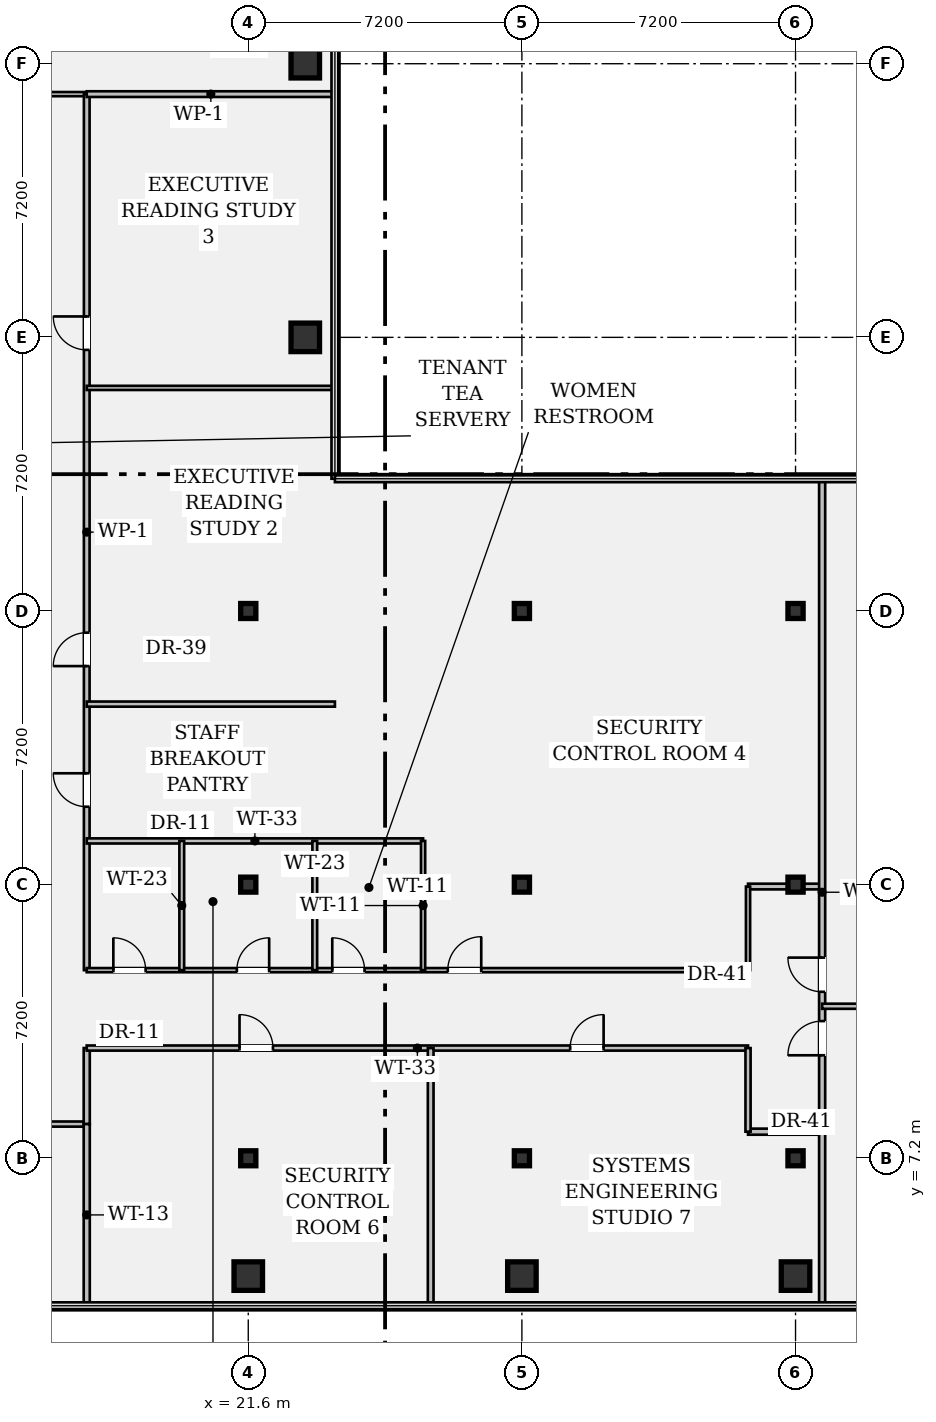
"""IFC4 building model, lengths in metres.
Left out: names, types, materials, properties, quantities, classifications, styles, units other than length and angle.
Written with IfcOpenShell. Run it as: python <this file> out.ifc"""

import sys

from ifc_helpers import new_model, si_unit, direction, frame, frame_2d, origin, origin_2d, place, context, subcontext, project, spatial, rectangle, hollow_rectangle, i_section, extrude, element, fill, save


model = new_model("IFC4")
c1 = context("Model", 3, precision=1e-05, world=origin(), true_north=direction((0.0, 1.0)))
c2 = subcontext(c1, "Body", "Model", "MODEL_VIEW")
j1 = project(units=[si_unit("LENGTHUNIT", "METRE"), si_unit("PLANEANGLEUNIT", "RADIAN")], contexts=[c1])
p1 = place(None, origin())
s1 = spatial("IfcSite", under=j1, at=p1, CompositionType="ELEMENT")
p2 = place(p1, origin())
s2 = spatial("IfcBuilding", under=s1, at=p2, CompositionType="ELEMENT")
p3 = place(p2, frame((0.0, 0.0, 225.75)))
s3 = spatial("IfcBuildingStorey", under=s2, at=p3, CompositionType="ELEMENT", Elevation=225.75)
p4 = place(p3, frame((21.6, 4.1, 0.0), z_axis=(0.0, 0.0, 1.0), x_axis=(1.0, 0.0, 0.0)))
e1 = element("IfcColumn", 1, at=p4, inside=s3, PredefinedType="COLUMN", context=c2, shape_type="SweptSolid", body=[
    extrude(hollow_rectangle(XDim=0.75, YDim=0.75, WallThickness=0.045, at=origin_2d()), origin(), (0.0, 0.0, 1.0), 3.24),
])
for number, where, z_axis, x_axis in (
    (2, (21.6, 7.2, 0.0), (0.0, 0.0, 1.0), (1.0, 0.0, 0.0)),
    (3, (21.6, 14.4, 0.0), (0.0, 0.0, 1.0), (1.0, 0.0, 0.0)),
    (4, (21.6, 21.6, 0.0), (0.0, 0.0, 1.0), (1.0, 0.0, 0.0)),
):
    element("IfcColumn", number, at=place(p3, frame(where, z_axis=z_axis, x_axis=x_axis)), inside=s3, PredefinedType="COLUMN", context=c2, shape_type="SweptSolid", body=[
        extrude(i_section(OverallWidth=0.399, OverallDepth=0.394, WebThickness=0.023, FlangeThickness=0.037, FilletRadius=0.018, at=origin_2d()), origin(), (0.0, 0.0, 1.0), 3.24),
    ])
for number, where, z_axis, x_axis in (
    (5, (23.1, 28.8, 0.0), (0.0, 0.0, 1.0), (1.0, 0.0, 0.0)),
    (6, (23.1, 36.0, 0.0), (0.0, 0.0, 1.0), (1.0, 0.0, 0.0)),
    (7, (28.8, 4.1, 0.0), (0.0, 0.0, 1.0), (1.0, 0.0, 0.0)),
):
    element("IfcColumn", number, at=place(p3, frame(where, z_axis=z_axis, x_axis=x_axis)), inside=s3, PredefinedType="COLUMN", context=c2, shape_type="SweptSolid", body=[
        extrude(hollow_rectangle(XDim=0.75, YDim=0.75, WallThickness=0.045, at=origin_2d()), origin(), (0.0, 0.0, 1.0), 3.24),
    ])
for number, where, z_axis, x_axis in (
    (8, (28.8, 7.2, 0.0), (0.0, 0.0, 1.0), (1.0, 0.0, 0.0)),
    (9, (28.8, 14.4, 0.0), (0.0, 0.0, 1.0), (1.0, 0.0, 0.0)),
    (10, (28.8, 21.6, 0.0), (0.0, 0.0, 1.0), (1.0, 0.0, 0.0)),
):
    element("IfcColumn", number, at=place(p3, frame(where, z_axis=z_axis, x_axis=x_axis)), inside=s3, PredefinedType="COLUMN", context=c2, shape_type="SweptSolid", body=[
        extrude(i_section(OverallWidth=0.399, OverallDepth=0.394, WebThickness=0.023, FlangeThickness=0.037, FilletRadius=0.018, at=origin_2d()), origin(), (0.0, 0.0, 1.0), 3.24),
    ])
p5 = place(p3, frame((36.0, 4.1, 0.0), z_axis=(0.0, 0.0, 1.0), x_axis=(1.0, 0.0, 0.0)))
e11 = element("IfcColumn", 11, at=p5, inside=s3, PredefinedType="COLUMN", context=c2, shape_type="SweptSolid", body=[
    extrude(hollow_rectangle(XDim=0.75, YDim=0.75, WallThickness=0.045, at=origin_2d()), origin(), (0.0, 0.0, 1.0), 3.24),
])
for number, where, z_axis, x_axis in (
    (12, (36.0, 7.2, 0.0), (0.0, 0.0, 1.0), (1.0, 0.0, 0.0)),
    (13, (36.0, 14.4, 0.0), (0.0, 0.0, 1.0), (1.0, 0.0, 0.0)),
    (14, (36.0, 21.6, 0.0), (0.0, 0.0, 1.0), (1.0, 0.0, 0.0)),
):
    element("IfcColumn", number, at=place(p3, frame(where, z_axis=z_axis, x_axis=x_axis)), inside=s3, PredefinedType="COLUMN", context=c2, shape_type="SweptSolid", body=[
        extrude(i_section(OverallWidth=0.399, OverallDepth=0.394, WebThickness=0.023, FlangeThickness=0.037, FilletRadius=0.018, at=origin_2d()), origin(), (0.0, 0.0, 1.0), 3.24),
    ])
p6 = place(p3, frame((14.4, 8.1, 0.0), z_axis=(0.0, 0.0, 1.0), x_axis=(1.0, 0.0, 0.0)))
e15 = element("IfcWall", 15, at=p6, inside=s3, PredefinedType="PARTITIONING", context=c2, shape_type="SweptSolid", body=[
    extrude(rectangle(XDim=2.95, YDim=0.135, at=frame_2d((1.475, 0.0))), origin(), (0.0, 0.0, 1.0), 2.808),
])
p7 = place(p6, frame((0.95, 0.0, 0.0)))
e16 = element("IfcOpeningElement", 16, at=p7, cuts=e15, PredefinedType="OPENING", context=c2, shape_type="SweptSolid", body=[
    extrude(rectangle(XDim=0.88, YDim=2.15, at=frame_2d((0.44, 1.075))), frame((0.0, 0.08, 0.0), z_axis=(0.0, -1.0, 0.0), x_axis=(1.0, 0.0, 0.0)), (0.0, 0.0, 1.0), 0.159),
])
p8 = place(p3, frame((14.4, 35.2, 0.0), z_axis=(0.0, 0.0, 1.0), x_axis=(1.0, 0.0, 0.0)))
e17 = element("IfcWall", 17, at=p8, inside=s3, PredefinedType="PARTITIONING", context=c2, shape_type="SweptSolid", body=[
    extrude(rectangle(XDim=2.95, YDim=0.11, at=frame_2d((1.475, 0.0))), origin(), (0.0, 0.0, 1.0), 2.808),
])
p9 = place(p8, frame((0.95, 0.0, 0.0)))
e18 = element("IfcOpeningElement", 18, at=p9, cuts=e17, PredefinedType="OPENING", context=c2, shape_type="SweptSolid", body=[
    extrude(rectangle(XDim=1.0, YDim=2.15, at=frame_2d((0.5, 1.075))), frame((0.0, 0.067, 0.0), z_axis=(0.0, -1.0, 0.0), x_axis=(1.0, 0.0, 0.0)), (0.0, 0.0, 1.0), 0.134),
])
p10 = place(p3, frame((17.35, 8.1, 0.0), z_axis=(0.0, 0.0, 1.0), x_axis=(0.0, 1.0, 0.0)))
e19 = element("IfcWall", 19, at=p10, inside=s3, PredefinedType="PARTITIONING", context=c2, shape_type="SweptSolid", body=[
    extrude(rectangle(XDim=2.0, YDim=0.16, at=frame_2d((1.0, 0.0))), origin(), (0.0, 0.0, 1.0), 3.24),
])
p11 = place(p3, frame((17.35, 12.15, 0.0), z_axis=(0.0, 0.0, 1.0), x_axis=(0.0, 1.0, 0.0)))
e20 = element("IfcWall", 20, at=p11, inside=s3, PredefinedType="PARTITIONING", context=c2, shape_type="SweptSolid", body=[
    extrude(rectangle(XDim=23.05, YDim=0.15, at=frame_2d((11.525, 0.0))), origin(), (0.0, 0.0, 1.0), 2.613),
])
p12 = place(p11, frame((4.3, 0.0, 0.0)))
e21 = element("IfcOpeningElement", 21, at=p12, cuts=e20, PredefinedType="OPENING", context=c2, shape_type="SweptSolid", body=[
    extrude(rectangle(XDim=0.88, YDim=2.15, at=frame_2d((0.44, 1.075))), frame((0.0, 0.087, 0.0), z_axis=(0.0, -1.0, 0.0), x_axis=(1.0, 0.0, 0.0)), (0.0, 0.0, 1.0), 0.174),
])
p13 = place(p11, frame((8.0, 0.0, 0.0)))
e22 = element("IfcOpeningElement", 22, at=p13, cuts=e20, PredefinedType="OPENING", context=c2, shape_type="SweptSolid", body=[
    extrude(rectangle(XDim=0.88, YDim=2.15, at=frame_2d((0.44, 1.075))), frame((0.0, 0.087, 0.0), z_axis=(0.0, -1.0, 0.0), x_axis=(1.0, 0.0, 0.0)), (0.0, 0.0, 1.0), 0.174),
])
p14 = place(p11, frame((16.32, 0.0, 0.0)))
e23 = element("IfcOpeningElement", 23, at=p14, cuts=e20, PredefinedType="OPENING", context=c2, shape_type="SweptSolid", body=[
    extrude(rectangle(XDim=0.88, YDim=2.15, at=frame_2d((0.44, 1.075))), frame((0.0, 0.087, 0.0), z_axis=(0.0, -1.0, 0.0), x_axis=(1.0, 0.0, 0.0)), (0.0, 0.0, 1.0), 0.174),
])
p15 = place(p3, frame((17.35, 10.1, 0.0), z_axis=(0.0, 0.0, 1.0), x_axis=(1.0, 0.0, 0.0)))
e24 = element("IfcWall", 24, at=p15, inside=s3, PredefinedType="PARTITIONING", context=c2, shape_type="SweptSolid", body=[
    extrude(rectangle(XDim=17.4, YDim=0.135, at=frame_2d((8.7, 0.0))), origin(), (0.0, 0.0, 1.0), 2.613),
])
p16 = place(p15, frame((4.02, 0.0, 0.0)))
e25 = element("IfcOpeningElement", 25, at=p16, cuts=e24, PredefinedType="OPENING", context=c2, shape_type="SweptSolid", body=[
    extrude(rectangle(XDim=0.88, YDim=2.15, at=frame_2d((0.44, 1.075))), frame((0.0, 0.08, 0.0), z_axis=(0.0, -1.0, 0.0), x_axis=(1.0, 0.0, 0.0)), (0.0, 0.0, 1.0), 0.159),
])
p17 = place(p15, frame((12.72, 0.0, 0.0)))
e26 = element("IfcOpeningElement", 26, at=p17, cuts=e24, PredefinedType="OPENING", context=c2, shape_type="SweptSolid", body=[
    extrude(rectangle(XDim=0.88, YDim=2.15, at=frame_2d((0.44, 1.075))), frame((0.0, 0.08, 0.0), z_axis=(0.0, -1.0, 0.0), x_axis=(1.0, 0.0, 0.0)), (0.0, 0.0, 1.0), 0.159),
])
p18 = place(p3, frame((17.35, 12.15, 0.0), z_axis=(0.0, 0.0, 1.0), x_axis=(1.0, 0.0, 0.0)))
e27 = element("IfcWall", 27, at=p18, inside=s3, PredefinedType="PARTITIONING", context=c2, shape_type="SweptSolid", body=[
    extrude(rectangle(XDim=17.4, YDim=0.11, at=frame_2d((8.7, 0.0))), origin(), (0.0, 0.0, 1.0), 2.613),
])
p19 = place(p18, frame((0.7, 0.0, 0.0)))
e28 = element("IfcOpeningElement", 28, at=p19, cuts=e27, PredefinedType="OPENING", context=c2, shape_type="SweptSolid", body=[
    extrude(rectangle(XDim=0.85, YDim=2.15, at=frame_2d((0.425, 1.075))), frame((0.0, 0.067, 0.0), z_axis=(0.0, -1.0, 0.0), x_axis=(1.0, 0.0, 0.0)), (0.0, 0.0, 1.0), 0.134),
])
p20 = place(p18, frame((3.95, 0.0, 0.0)))
e29 = element("IfcOpeningElement", 29, at=p20, cuts=e27, PredefinedType="OPENING", context=c2, shape_type="SweptSolid", body=[
    extrude(rectangle(XDim=0.85, YDim=2.15, at=frame_2d((0.425, 1.075))), frame((0.0, 0.067, 0.0), z_axis=(0.0, -1.0, 0.0), x_axis=(1.0, 0.0, 0.0)), (0.0, 0.0, 1.0), 0.134),
])
p21 = place(p18, frame((6.46, 0.0, 0.0)))
e30 = element("IfcOpeningElement", 30, at=p21, cuts=e27, PredefinedType="OPENING", context=c2, shape_type="SweptSolid", body=[
    extrude(rectangle(XDim=0.85, YDim=2.15, at=frame_2d((0.425, 1.075))), frame((0.0, 0.067, 0.0), z_axis=(0.0, -1.0, 0.0), x_axis=(1.0, 0.0, 0.0)), (0.0, 0.0, 1.0), 0.134),
])
p22 = place(p18, frame((9.5, 0.0, 0.0)))
e31 = element("IfcOpeningElement", 31, at=p22, cuts=e27, PredefinedType="OPENING", context=c2, shape_type="SweptSolid", body=[
    extrude(rectangle(XDim=0.88, YDim=2.15, at=frame_2d((0.44, 1.075))), frame((0.0, 0.067, 0.0), z_axis=(0.0, -1.0, 0.0), x_axis=(1.0, 0.0, 0.0)), (0.0, 0.0, 1.0), 0.134),
])
p23 = place(p3, frame((34.75, 7.9, 0.0), z_axis=(0.0, 0.0, 1.0), x_axis=(1.0, 0.0, 0.0)))
e32 = element("IfcWall", 32, at=p23, inside=s3, PredefinedType="PARTITIONING", context=c2, shape_type="SweptSolid", body=[
    extrude(rectangle(XDim=1.95, YDim=0.16, at=frame_2d((0.975, 0.0))), origin(), (0.0, 0.0, 1.0), 2.613),
])
p24 = place(p3, frame((34.75, 14.35, 0.0), z_axis=(0.0, 0.0, 1.0), x_axis=(1.0, 0.0, 0.0)))
e33 = element("IfcWall", 33, at=p24, inside=s3, PredefinedType="PARTITIONING", context=c2, shape_type="SweptSolid", body=[
    extrude(rectangle(XDim=1.95, YDim=0.15, at=frame_2d((0.975, 0.0))), origin(), (0.0, 0.0, 1.0), 2.613),
])
p25 = place(p3, frame((34.75, 7.9, 0.0), z_axis=(0.0, 0.0, 1.0), x_axis=(0.0, 1.0, 0.0)))
e34 = element("IfcWall", 34, at=p25, inside=s3, PredefinedType="PARTITIONING", context=c2, shape_type="SweptSolid", body=[
    extrude(rectangle(XDim=2.2, YDim=0.135, at=frame_2d((1.1, 0.0))), origin(), (0.0, 0.0, 1.0), 3.24),
])
p26 = place(p3, frame((34.75, 12.15, 0.0), z_axis=(0.0, 0.0, 1.0), x_axis=(0.0, 1.0, 0.0)))
e35 = element("IfcWall", 35, at=p26, inside=s3, PredefinedType="PARTITIONING", context=c2, shape_type="SweptSolid", body=[
    extrude(rectangle(XDim=2.2, YDim=0.11, at=frame_2d((1.1, 0.0))), origin(), (0.0, 0.0, 1.0), 3.24),
])
p27 = place(p3, frame((36.7, 3.32, 0.0), z_axis=(0.0, 0.0, 1.0), x_axis=(0.0, 1.0, 0.0)))
e36 = element("IfcWall", 36, at=p27, inside=s3, PredefinedType="PARTITIONING", context=c2, shape_type="SweptSolid", body=[
    extrude(rectangle(XDim=21.76, YDim=0.16, at=frame_2d((10.88, 0.0))), origin(), (0.0, 0.0, 1.0), 2.613),
])
p28 = place(p27, frame((6.59, 0.0, 0.0)))
e37 = element("IfcOpeningElement", 37, at=p28, cuts=e36, PredefinedType="OPENING", context=c2, shape_type="SweptSolid", body=[
    extrude(rectangle(XDim=0.9, YDim=2.15, at=frame_2d((0.45, 1.075))), frame((0.0, 0.092, 0.0), z_axis=(0.0, -1.0, 0.0), x_axis=(1.0, 0.0, 0.0)), (0.0, 0.0, 1.0), 0.184),
])
p29 = place(p27, frame((8.26, 0.0, 0.0)))
e38 = element("IfcOpeningElement", 38, at=p29, cuts=e36, PredefinedType="OPENING", context=c2, shape_type="SweptSolid", body=[
    extrude(rectangle(XDim=0.9, YDim=2.15, at=frame_2d((0.45, 1.075))), frame((0.0, 0.092, 0.0), z_axis=(0.0, -1.0, 0.0), x_axis=(1.0, 0.0, 0.0)), (0.0, 0.0, 1.0), 0.184),
])
p30 = place(p3, frame((17.35, 35.2, 0.0), z_axis=(0.0, 0.0, 1.0), x_axis=(1.0, 0.0, 0.0)))
e39 = element("IfcWall", 39, at=p30, inside=s3, PredefinedType="PARTITIONING", context=c2, shape_type="SweptSolid", body=[
    extrude(rectangle(XDim=6.53, YDim=0.15, at=frame_2d((3.265, 0.0))), origin(), (0.0, 0.0, 1.0), 2.808),
])
p31 = place(p3, frame((17.35, 15.55, 0.0), z_axis=(0.0, 0.0, 1.0), x_axis=(1.0, 0.0, 0.0)))
e40 = element("IfcWall", 40, at=p31, inside=s3, PredefinedType="PARTITIONING", context=c2, shape_type="SweptSolid", body=[
    extrude(rectangle(XDim=8.85, YDim=0.135, at=frame_2d((4.425, 0.0))), origin(), (0.0, 0.0, 1.0), 2.613),
])
p32 = place(p3, frame((26.2, 12.15, 0.0), z_axis=(0.0, 0.0, 1.0), x_axis=(0.0, 1.0, 0.0)))
e41 = element("IfcWall", 41, at=p32, inside=s3, PredefinedType="PARTITIONING", context=c2, shape_type="SweptSolid", body=[
    extrude(rectangle(XDim=3.4, YDim=0.11, at=frame_2d((1.7, 0.0))), origin(), (0.0, 0.0, 1.0), 2.613),
])
for number, where, z_axis, x_axis in (
    (42, (19.85, 12.15, 0.0), (0.0, 0.0, 1.0), (0.0, 1.0, 0.0)),
    (43, (23.35, 12.15, 0.0), (0.0, 0.0, 1.0), (0.0, 1.0, 0.0)),
):
    element("IfcWall", number, at=place(p3, frame(where, z_axis=z_axis, x_axis=x_axis)), inside=s3, PredefinedType="PARTITIONING", context=c2, shape_type="SweptSolid", body=[
        extrude(rectangle(XDim=3.4, YDim=0.125, at=frame_2d((1.7, 0.0))), origin(), (0.0, 0.0, 1.0), 2.613),
    ])
p33 = place(p3, frame((17.35, 19.15, 0.0), z_axis=(0.0, 0.0, 1.0), x_axis=(1.0, 0.0, 0.0)))
e44 = element("IfcWall", 44, at=p33, inside=s3, PredefinedType="PARTITIONING", context=c2, shape_type="SweptSolid", body=[
    extrude(rectangle(XDim=6.53, YDim=0.135, at=frame_2d((3.265, 0.0))), origin(), (0.0, 0.0, 1.0), 2.613),
])
p34 = place(p3, frame((17.35, 27.47, 0.0), z_axis=(0.0, 0.0, 1.0), x_axis=(1.0, 0.0, 0.0)))
e45 = element("IfcWall", 45, at=p34, inside=s3, PredefinedType="PARTITIONING", context=c2, shape_type="SweptSolid", body=[
    extrude(rectangle(XDim=6.53, YDim=0.11, at=frame_2d((3.265, 0.0))), origin(), (0.0, 0.0, 1.0), 2.808),
])
p35 = place(p3, frame((17.35, 3.32, 0.0), z_axis=(0.0, 0.0, 1.0), x_axis=(0.0, 1.0, 0.0)))
e46 = element("IfcWall", 46, at=p35, inside=s3, PredefinedType="PARTITIONING", context=c2, shape_type="SweptSolid", body=[
    extrude(rectangle(XDim=4.78, YDim=0.16, at=frame_2d((2.39, 0.0))), origin(), (0.0, 0.0, 1.0), 2.613),
])
p36 = place(p3, frame((26.4, 3.32, 0.0), z_axis=(0.0, 0.0, 1.0), x_axis=(0.0, 1.0, 0.0)))
e47 = element("IfcWall", 47, at=p36, inside=s3, PredefinedType="PARTITIONING", context=c2, shape_type="SweptSolid", body=[
    extrude(rectangle(XDim=6.78, YDim=0.15, at=frame_2d((3.39, 0.0))), origin(), (0.0, 0.0, 1.0), 2.613),
])
p37 = place(p3, frame((36.7, 11.2, 0.0), z_axis=(0.0, 0.0, 1.0), x_axis=(1.0, 0.0, 0.0)))
e48 = element("IfcWall", 48, at=p37, inside=s3, PredefinedType="PARTITIONING", context=c2, shape_type="SweptSolid", body=[
    extrude(rectangle(XDim=7.18, YDim=0.135, at=frame_2d((3.59, 0.0))), origin(), (0.0, 0.0, 1.0), 2.808),
])
p38 = place(p19, origin())
e49 = element("IfcDoor", 49, at=p38, inside=s3, OperationType="SINGLE_SWING_LEFT", PredefinedType="DOOR", context=c2, shape_type="SweptSolid", body=[
    extrude(rectangle(XDim=0.85, YDim=2.15, at=frame_2d((0.425, 1.075))), frame((0.0, 0.025, 0.0), z_axis=(0.0, -1.0, 0.0), x_axis=(1.0, 0.0, 0.0)), (0.0, 0.0, 1.0), 0.05),
])
fill(e28, e49)
p39 = place(p20, origin())
e50 = element("IfcDoor", 50, at=p39, inside=s3, OperationType="SINGLE_SWING_RIGHT", PredefinedType="DOOR", context=c2, shape_type="SweptSolid", body=[
    extrude(rectangle(XDim=0.85, YDim=2.15, at=frame_2d((0.425, 1.075))), frame((0.0, 0.025, 0.0), z_axis=(0.0, -1.0, 0.0), x_axis=(1.0, 0.0, 0.0)), (0.0, 0.0, 1.0), 0.05),
])
fill(e29, e50)
p40 = place(p21, origin())
e51 = element("IfcDoor", 51, at=p40, inside=s3, OperationType="SINGLE_SWING_LEFT", PredefinedType="DOOR", context=c2, shape_type="SweptSolid", body=[
    extrude(rectangle(XDim=0.85, YDim=2.15, at=frame_2d((0.425, 1.075))), frame((0.0, 0.025, 0.0), z_axis=(0.0, -1.0, 0.0), x_axis=(1.0, 0.0, 0.0)), (0.0, 0.0, 1.0), 0.05),
])
fill(e30, e51)
p41 = place(p12, origin())
e52 = element("IfcDoor", 52, at=p41, inside=s3, OperationType="SINGLE_SWING_RIGHT", PredefinedType="DOOR", context=c2, shape_type="SweptSolid", body=[
    extrude(rectangle(XDim=0.88, YDim=2.15, at=frame_2d((0.44, 1.075))), frame((0.0, 0.025, 0.0), z_axis=(0.0, -1.0, 0.0), x_axis=(1.0, 0.0, 0.0)), (0.0, 0.0, 1.0), 0.05),
])
fill(e21, e52)
p42 = place(p13, origin())
e53 = element("IfcDoor", 53, at=p42, inside=s3, OperationType="SINGLE_SWING_LEFT", PredefinedType="DOOR", context=c2, shape_type="SweptSolid", body=[
    extrude(rectangle(XDim=0.88, YDim=2.15, at=frame_2d((0.44, 1.075))), frame((0.0, 0.025, 0.0), z_axis=(0.0, -1.0, 0.0), x_axis=(1.0, 0.0, 0.0)), (0.0, 0.0, 1.0), 0.05),
])
fill(e22, e53)
p43 = place(p14, origin())
e54 = element("IfcDoor", 54, at=p43, inside=s3, OperationType="SINGLE_SWING_RIGHT", PredefinedType="DOOR", context=c2, shape_type="SweptSolid", body=[
    extrude(rectangle(XDim=0.88, YDim=2.15, at=frame_2d((0.44, 1.075))), frame((0.0, 0.025, 0.0), z_axis=(0.0, -1.0, 0.0), x_axis=(1.0, 0.0, 0.0)), (0.0, 0.0, 1.0), 0.05),
])
fill(e23, e54)
p44 = place(p22, origin())
e55 = element("IfcDoor", 55, at=p44, inside=s3, OperationType="SINGLE_SWING_RIGHT", PredefinedType="DOOR", context=c2, shape_type="SweptSolid", body=[
    extrude(rectangle(XDim=0.88, YDim=2.15, at=frame_2d((0.44, 1.075))), frame((0.0, 0.025, 0.0), z_axis=(0.0, -1.0, 0.0), x_axis=(1.0, 0.0, 0.0)), (0.0, 0.0, 1.0), 0.05),
])
fill(e31, e55)
p45 = place(p16, origin())
e56 = element("IfcDoor", 56, at=p45, inside=s3, OperationType="SINGLE_SWING_LEFT", PredefinedType="DOOR", context=c2, shape_type="SweptSolid", body=[
    extrude(rectangle(XDim=0.88, YDim=2.15, at=frame_2d((0.44, 1.075))), frame((0.0, 0.025, 0.0), z_axis=(0.0, -1.0, 0.0), x_axis=(1.0, 0.0, 0.0)), (0.0, 0.0, 1.0), 0.05),
])
fill(e25, e56)
p46 = place(p17, origin())
e57 = element("IfcDoor", 57, at=p46, inside=s3, OperationType="SINGLE_SWING_RIGHT", PredefinedType="DOOR", context=c2, shape_type="SweptSolid", body=[
    extrude(rectangle(XDim=0.88, YDim=2.15, at=frame_2d((0.44, 1.075))), frame((0.0, 0.025, 0.0), z_axis=(0.0, -1.0, 0.0), x_axis=(1.0, 0.0, 0.0)), (0.0, 0.0, 1.0), 0.05),
])
fill(e26, e57)
p47 = place(p28, origin())
e58 = element("IfcDoor", 58, at=p47, inside=s3, OperationType="SINGLE_SWING_LEFT", PredefinedType="DOOR", context=c2, shape_type="SweptSolid", body=[
    extrude(rectangle(XDim=0.9, YDim=2.15, at=frame_2d((0.45, 1.075))), frame((0.0, 0.025, 0.0), z_axis=(0.0, -1.0, 0.0), x_axis=(1.0, 0.0, 0.0)), (0.0, 0.0, 1.0), 0.05),
])
fill(e37, e58)
p48 = place(p29, origin())
e59 = element("IfcDoor", 59, at=p48, inside=s3, OperationType="SINGLE_SWING_RIGHT", PredefinedType="DOOR", context=c2, shape_type="SweptSolid", body=[
    extrude(rectangle(XDim=0.9, YDim=2.15, at=frame_2d((0.45, 1.075))), frame((0.0, 0.025, 0.0), z_axis=(0.0, -1.0, 0.0), x_axis=(1.0, 0.0, 0.0)), (0.0, 0.0, 1.0), 0.05),
])
fill(e38, e59)
save(model, sys.argv[1])
